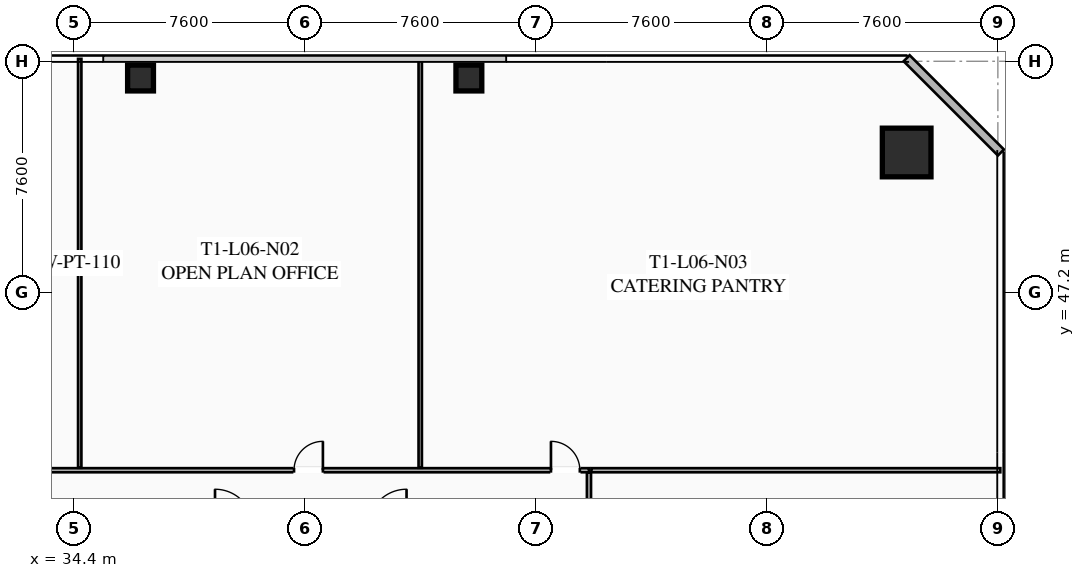
"""IFC4 building model, lengths in metres.
Left out: names, types, materials, properties, quantities, classifications, styles, units other than length and angle.
Written with IfcOpenShell. Run it as: python <this file> out.ifc"""

import sys

from ifc_helpers import new_model, si_unit, direction, frame, frame_2d, origin, origin_2d, place, context, subcontext, project, spatial, rectangle, hollow_rectangle, extrude, element, fill, save


model = new_model("IFC4")
c1 = context("Model", 3, precision=1e-05, world=origin(), true_north=direction((0.0, 1.0)))
c2 = subcontext(c1, "Body", "Model", "MODEL_VIEW")
j1 = project(units=[si_unit("LENGTHUNIT", "METRE"), si_unit("PLANEANGLEUNIT", "RADIAN")], contexts=[c1])
p1 = place(None, origin())
s1 = spatial("IfcSite", under=j1, at=p1, CompositionType="ELEMENT")
p2 = place(p1, origin())
s2 = spatial("IfcBuilding", under=s1, at=p2, CompositionType="ELEMENT")
p3 = place(p2, frame((0.0, 0.0, 28.15)))
s3 = spatial("IfcBuildingStorey", under=s2, at=p3, CompositionType="ELEMENT", Elevation=28.15)
p4 = place(p3, frame((61.8, 51.8, 0.0), z_axis=(0.0, 0.0, 1.0), x_axis=(1.0, 0.0, 0.0)))
e1 = element("IfcColumn", 1, at=p4, inside=s3, PredefinedType="COLUMN", context=c2, shape_type="SweptSolid", body=[
    extrude(hollow_rectangle(XDim=1.6, YDim=1.6, WallThickness=0.06, at=origin_2d()), origin(), (0.0, 0.0, 1.0), 3.35),
])
for number, where, z_axis, x_axis in (
    (2, (47.4, 54.25, 0.0), (0.0, 0.0, 1.0), (1.0, 0.0, 0.0)),
    (3, (36.6, 54.25, 0.0), (0.0, 0.0, 1.0), (1.0, 0.0, 0.0)),
):
    element("IfcColumn", number, at=place(p3, frame(where, z_axis=z_axis, x_axis=x_axis)), inside=s3, PredefinedType="COLUMN", context=c2, shape_type="SweptSolid", body=[
        extrude(hollow_rectangle(XDim=0.85, YDim=0.85, WallThickness=0.035, at=origin_2d()), origin(), (0.0, 0.0, 1.0), 3.35),
    ])
p5 = place(p3, frame((61.8, 54.9, 0.0), z_axis=(0.0, 0.0, 1.0), x_axis=(0.707106781187, -0.707106781187, 0.0)))
e4 = element("IfcWall", 4, at=p5, inside=s3, PredefinedType="SOLIDWALL", context=c2, shape_type="SweptSolid", body=[
    extrude(rectangle(XDim=4.384, YDim=0.28, at=frame_2d((2.192, 0.0))), origin(), (0.0, 0.0, 1.0), 3.35),
])
p6 = place(p3, frame((22.35, 41.35, 0.0), z_axis=(0.0, 0.0, 1.0), x_axis=(1.0, 0.0, 0.0)))
e5 = element("IfcWall", 5, at=p6, inside=s3, PredefinedType="PARTITIONING", context=c2, shape_type="SweptSolid", body=[
    extrude(rectangle(XDim=29.0, YDim=0.135, at=frame_2d((14.5, 0.0))), origin(), (0.0, 0.0, 1.0), 2.703),
])
p7 = place(p6, frame((0.3, 0.0, 0.0)))
e6 = element("IfcOpeningElement", 6, at=p7, cuts=e5, PredefinedType="OPENING", context=c2, shape_type="SweptSolid", body=[
    extrude(rectangle(XDim=0.95, YDim=2.05, at=frame_2d((0.475, 1.025))), frame((0.0, 0.077, 0.0), z_axis=(0.0, -1.0, 0.0), x_axis=(1.0, 0.0, 0.0)), (0.0, 0.0, 1.0), 0.155),
])
p8 = place(p6, frame((19.299, 0.0, 0.0)))
e7 = element("IfcOpeningElement", 7, at=p8, cuts=e5, PredefinedType="OPENING", context=c2, shape_type="SweptSolid", body=[
    extrude(rectangle(XDim=0.95, YDim=2.05, at=frame_2d((0.475, 1.025))), frame((0.0, 0.077, 0.0), z_axis=(0.0, -1.0, 0.0), x_axis=(1.0, 0.0, 0.0)), (0.0, 0.0, 1.0), 0.155),
])
p9 = place(p6, frame((27.75, 0.0, 0.0)))
e8 = element("IfcOpeningElement", 8, at=p9, cuts=e5, PredefinedType="OPENING", context=c2, shape_type="SweptSolid", body=[
    extrude(rectangle(XDim=0.95, YDim=2.05, at=frame_2d((0.475, 1.025))), frame((0.0, 0.077, 0.0), z_axis=(0.0, -1.0, 0.0), x_axis=(1.0, 0.0, 0.0)), (0.0, 0.0, 1.0), 0.155),
])
for number, where, z_axis, x_axis in (
    (9, (34.6, 41.43, 0.0), (0.0, 0.0, 1.0), (0.0, 1.0, 0.0)),
    (10, (45.8, 41.43, 0.0), (0.0, 0.0, 1.0), (0.0, 1.0, 0.0)),
):
    element("IfcWall", number, at=place(p3, frame(where, z_axis=z_axis, x_axis=x_axis)), inside=s3, PredefinedType="PARTITIONING", context=c2, shape_type="SweptSolid", body=[
        extrude(rectangle(XDim=13.45, YDim=0.11, at=frame_2d((6.725, 0.0))), origin(), (0.0, 0.0, 1.0), 2.703),
    ])
p10 = place(p3, frame((51.35, 41.27, 0.0), z_axis=(0.0, 0.0, 1.0), x_axis=(0.0, -1.0, 0.0)))
e11 = element("IfcWall", 11, at=p10, inside=s3, PredefinedType="PARTITIONING", context=c2, shape_type="SweptSolid", body=[
    extrude(rectangle(XDim=18.86, YDim=0.135, at=frame_2d((9.43, 0.0))), origin(), (0.0, 0.0, 1.0), 2.703),
])
p11 = place(p10, frame((8.579, 0.0, 0.0)))
e12 = element("IfcOpeningElement", 12, at=p11, cuts=e11, PredefinedType="OPENING", context=c2, shape_type="SweptSolid", body=[
    extrude(rectangle(XDim=0.95, YDim=2.05, at=frame_2d((0.475, 1.025))), frame((0.0, 0.077, 0.0), z_axis=(0.0, -1.0, 0.0), x_axis=(1.0, 0.0, 0.0)), (0.0, 0.0, 1.0), 0.155),
])
p12 = place(p3, frame((64.88, 41.35, 0.0), z_axis=(0.0, 0.0, 1.0), x_axis=(-1.0, 0.0, 0.0)))
e13 = element("IfcWall", 13, at=p12, inside=s3, PredefinedType="PARTITIONING", context=c2, shape_type="SweptSolid", body=[
    extrude(rectangle(XDim=13.45, YDim=0.135, at=frame_2d((6.725, 0.0))), origin(), (0.0, 0.0, 1.0), 2.703),
])
p13 = place(p8, origin())
e14 = element("IfcDoor", 14, at=p13, inside=s3, OperationType="SINGLE_SWING_RIGHT", PredefinedType="DOOR", context=c2, shape_type="SweptSolid", body=[
    extrude(rectangle(XDim=0.95, YDim=2.05, at=frame_2d((0.475, 1.025))), frame((0.0, 0.025, 0.0), z_axis=(0.0, -1.0, 0.0), x_axis=(1.0, 0.0, 0.0)), (0.0, 0.0, 1.0), 0.05),
])
fill(e7, e14)
p14 = place(p9, origin())
e15 = element("IfcDoor", 15, at=p14, inside=s3, OperationType="SINGLE_SWING_LEFT", PredefinedType="DOOR", context=c2, shape_type="SweptSolid", body=[
    extrude(rectangle(XDim=0.95, YDim=2.05, at=frame_2d((0.475, 1.025))), frame((0.0, 0.025, 0.0), z_axis=(0.0, -1.0, 0.0), x_axis=(1.0, 0.0, 0.0)), (0.0, 0.0, 1.0), 0.05),
])
fill(e8, e15)
save(model, sys.argv[1])
